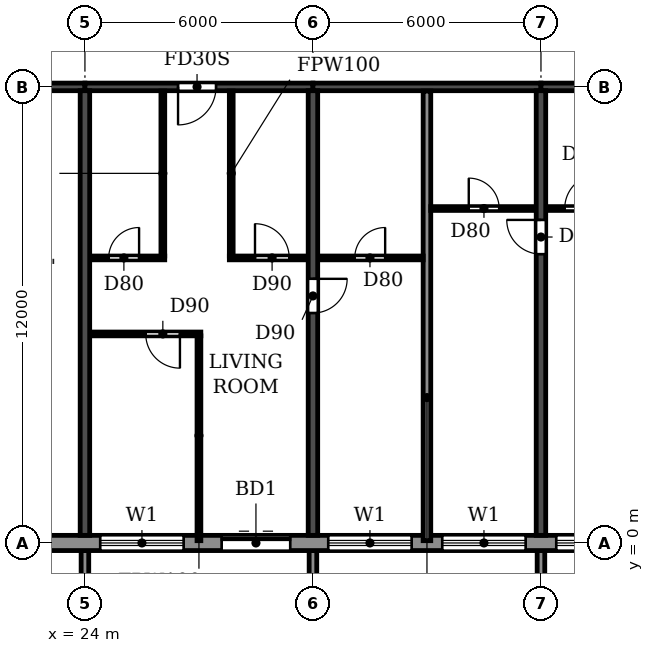
"""IFC4 building model, lengths in metres.
Left out: names, types, materials, properties, quantities, classifications, styles, units other than length and angle.
Written with IfcOpenShell. Run it as: python <this file> out.ifc"""

import sys

from ifc_helpers import new_model, si_unit, direction, frame, frame_2d, origin, place, context, subcontext, project, spatial, polyline, rectangle, outline, extrude, source, transform, mapped, element, fill, save


model = new_model("IFC4")
c1 = context("Model", 3, precision=1e-05, world=origin(), true_north=direction((0.0, 1.0)))
c2 = subcontext(c1, "Body", "Model", "MODEL_VIEW")
j1 = project(units=[si_unit("LENGTHUNIT", "METRE"), si_unit("PLANEANGLEUNIT", "RADIAN")], contexts=[c1])
p1 = place(None, origin())
s1 = spatial("IfcSite", under=j1, at=p1, CompositionType="ELEMENT")
p2 = place(p1, origin())
s2 = spatial("IfcBuilding", under=s1, at=p2, CompositionType="ELEMENT")
p3 = place(p2, frame((0.0, 0.0, 251.1)))
s3 = spatial("IfcBuildingStorey", under=s2, at=p3, CompositionType="ELEMENT", Elevation=251.1)
p4 = place(p3, frame((24.0, 0.2, 0.0), z_axis=(0.0, 0.0, 1.0), x_axis=(0.0, 1.0, 0.0)))
e1 = element("IfcWall", 1, at=p4, inside=s3, PredefinedType="SHEAR", context=c2, shape_type="SweptSolid", body=[
    extrude(rectangle(XDim=11.7, YDim=0.25, at=frame_2d((5.85, 0.0))), origin(), (0.0, 0.0, 1.0), 3.08),
])
p5 = place(p3, frame((30.0, 0.2, 0.0), z_axis=(0.0, 0.0, 1.0), x_axis=(0.0, 1.0, 0.0)))
e2 = element("IfcWall", 2, at=p5, inside=s3, PredefinedType="SHEAR", context=c2, shape_type="SweptSolid", body=[
    extrude(rectangle(XDim=11.7, YDim=0.25, at=frame_2d((5.85, 0.0))), origin(), (0.0, 0.0, 1.0), 3.08),
])
p6 = place(p5, frame((5.85, 0.0, 0.0)))
e3 = element("IfcOpeningElement", 3, at=p6, cuts=e2, PredefinedType="OPENING", context=c2, shape_type="SweptSolid", body=[
    extrude(rectangle(XDim=0.9, YDim=2.1, at=frame_2d((0.45, 1.05))), frame((0.0, 0.135, 0.0), z_axis=(0.0, -1.0, 0.0), x_axis=(1.0, 0.0, 0.0)), (0.0, 0.0, 1.0), 0.27),
])
p7 = place(p3, frame((36.0, 0.2, 0.0), z_axis=(0.0, 0.0, 1.0), x_axis=(0.0, 1.0, 0.0)))
e4 = element("IfcWall", 4, at=p7, inside=s3, PredefinedType="SHEAR", context=c2, shape_type="SweptSolid", body=[
    extrude(rectangle(XDim=11.7, YDim=0.25, at=frame_2d((5.85, 0.0))), origin(), (0.0, 0.0, 1.0), 3.08),
])
p8 = place(p7, frame((7.4, 0.0, 0.0)))
e5 = element("IfcOpeningElement", 5, at=p8, cuts=e4, PredefinedType="OPENING", context=c2, shape_type="SweptSolid", body=[
    extrude(rectangle(XDim=0.9, YDim=2.1, at=frame_2d((0.45, 1.05))), frame((0.0, 0.135, 0.0), z_axis=(0.0, -1.0, 0.0), x_axis=(1.0, 0.0, 0.0)), (0.0, 0.0, 1.0), 0.27),
])
p9 = place(p3, frame((18.2, 12.0, 0.0), z_axis=(0.0, 0.0, 1.0), x_axis=(1.0, 0.0, 0.0)))
e6 = element("IfcWall", 6, at=p9, inside=s3, PredefinedType="SHEAR", context=c2, shape_type="SweptSolid", body=[
    extrude(rectangle(XDim=5.8, YDim=0.2, at=frame_2d((2.9, 0.0))), origin(), (0.0, 0.0, 1.0), 2.48),
])
p10 = place(p9, frame((2.3, 0.0, 0.0)))
e7 = element("IfcOpeningElement", 7, at=p10, cuts=e6, PredefinedType="OPENING", context=c2, shape_type="SweptSolid", body=[
    extrude(rectangle(XDim=1.0, YDim=2.1, at=frame_2d((0.5, 1.05))), frame((0.0, 0.11, 0.0), z_axis=(0.0, -1.0, 0.0), x_axis=(1.0, 0.0, 0.0)), (0.0, 0.0, 1.0), 0.22),
])
p11 = place(p3, frame((24.0, 12.0, 0.0), z_axis=(0.0, 0.0, 1.0), x_axis=(1.0, 0.0, 0.0)))
e8 = element("IfcWall", 8, at=p11, inside=s3, PredefinedType="SHEAR", context=c2, shape_type="SweptSolid", body=[
    extrude(rectangle(XDim=6.0, YDim=0.2, at=frame_2d((3.0, 0.0))), origin(), (0.0, 0.0, 1.0), 2.48),
])
p12 = place(p11, frame((2.45, 0.0, 0.0)))
e9 = element("IfcOpeningElement", 9, at=p12, cuts=e8, PredefinedType="OPENING", context=c2, shape_type="SweptSolid", body=[
    extrude(rectangle(XDim=1.0, YDim=2.1, at=frame_2d((0.5, 1.05))), frame((0.0, 0.11, 0.0), z_axis=(0.0, -1.0, 0.0), x_axis=(1.0, 0.0, 0.0)), (0.0, 0.0, 1.0), 0.22),
])
p13 = place(p3, frame((30.0, 12.0, 0.0), z_axis=(0.0, 0.0, 1.0), x_axis=(1.0, 0.0, 0.0)))
e10 = element("IfcWall", 10, at=p13, inside=s3, PredefinedType="SHEAR", context=c2, shape_type="SweptSolid", body=[
    extrude(rectangle(XDim=6.0, YDim=0.2, at=frame_2d((3.0, 0.0))), origin(), (0.0, 0.0, 1.0), 2.48),
])
p14 = place(p3, frame((36.0, 12.0, 0.0), z_axis=(0.0, 0.0, 1.0), x_axis=(1.0, 0.0, 0.0)))
e11 = element("IfcWall", 11, at=p14, inside=s3, PredefinedType="SHEAR", context=c2, shape_type="SweptSolid", body=[
    extrude(rectangle(XDim=6.0, YDim=0.2, at=frame_2d((3.0, 0.0))), origin(), (0.0, 0.0, 1.0), 2.48),
])
p15 = place(p14, frame((2.55, 0.0, 0.0)))
e12 = element("IfcOpeningElement", 12, at=p15, cuts=e11, PredefinedType="OPENING", context=c2, shape_type="SweptSolid", body=[
    extrude(rectangle(XDim=1.0, YDim=2.1, at=frame_2d((0.5, 1.05))), frame((0.0, 0.11, 0.0), z_axis=(0.0, -1.0, 0.0), x_axis=(1.0, 0.0, 0.0)), (0.0, 0.0, 1.0), 0.22),
])
p16 = place(p3, frame((22.683, 0.0, 0.0), z_axis=(0.0, 0.0, 1.0), x_axis=(1.0, 0.0, 0.0)))
e13 = element("IfcWall", 13, at=p16, inside=s3, PredefinedType="STANDARD", context=c2, shape_type="SweptSolid", body=[
    extrude(rectangle(XDim=56.634, YDim=0.4, at=frame_2d((28.317, 0.0))), origin(), (0.0, 0.0, 1.0), 3.08),
])
p17 = place(p16, frame((1.717, 0.0, 0.9)))
e14 = element("IfcOpeningElement", 14, at=p17, cuts=e13, PredefinedType="OPENING", context=c2, shape_type="SweptSolid", body=[
    extrude(rectangle(XDim=2.2, YDim=1.5, at=frame_2d((1.1, 0.75))), frame((0.0, 0.21, 0.0), z_axis=(0.0, -1.0, 0.0), x_axis=(1.0, 0.0, 0.0)), (0.0, 0.0, 1.0), 0.42),
])
p18 = place(p16, frame((4.917, 0.0, 0.0)))
e15 = element("IfcOpeningElement", 15, at=p18, cuts=e13, PredefinedType="OPENING", context=c2, shape_type="SweptSolid", body=[
    extrude(rectangle(XDim=1.8, YDim=2.4, at=frame_2d((0.9, 1.2))), frame((0.0, 0.21, 0.0), z_axis=(0.0, -1.0, 0.0), x_axis=(1.0, 0.0, 0.0)), (0.0, 0.0, 1.0), 0.42),
])
p19 = place(p16, frame((7.717, 0.0, 0.9)))
e16 = element("IfcOpeningElement", 16, at=p19, cuts=e13, PredefinedType="OPENING", context=c2, shape_type="SweptSolid", body=[
    extrude(rectangle(XDim=2.2, YDim=1.5, at=frame_2d((1.1, 0.75))), frame((0.0, 0.21, 0.0), z_axis=(0.0, -1.0, 0.0), x_axis=(1.0, 0.0, 0.0)), (0.0, 0.0, 1.0), 0.42),
])
p20 = place(p16, frame((10.717, 0.0, 0.9)))
e17 = element("IfcOpeningElement", 17, at=p20, cuts=e13, PredefinedType="OPENING", context=c2, shape_type="SweptSolid", body=[
    extrude(rectangle(XDim=2.2, YDim=1.5, at=frame_2d((1.1, 0.75))), frame((0.0, 0.21, 0.0), z_axis=(0.0, -1.0, 0.0), x_axis=(1.0, 0.0, 0.0)), (0.0, 0.0, 1.0), 0.42),
])
p21 = place(p16, frame((13.717, 0.0, 0.9)))
e18 = element("IfcOpeningElement", 18, at=p21, cuts=e13, PredefinedType="OPENING", context=c2, shape_type="SweptSolid", body=[
    extrude(rectangle(XDim=2.2, YDim=1.5, at=frame_2d((1.1, 0.75))), frame((0.0, 0.21, 0.0), z_axis=(0.0, -1.0, 0.0), x_axis=(1.0, 0.0, 0.0)), (0.0, 0.0, 1.0), 0.42),
])
p22 = place(p16, frame((16.917, 0.0, 0.0)))
e19 = element("IfcOpeningElement", 19, at=p22, cuts=e13, PredefinedType="OPENING", context=c2, shape_type="SweptSolid", body=[
    extrude(rectangle(XDim=1.8, YDim=2.4, at=frame_2d((0.9, 1.2))), frame((0.0, 0.21, 0.0), z_axis=(0.0, -1.0, 0.0), x_axis=(1.0, 0.0, 0.0)), (0.0, 0.0, 1.0), 0.42),
])
p23 = place(p16, frame((19.717, 0.0, 0.9)))
e20 = element("IfcOpeningElement", 20, at=p23, cuts=e13, PredefinedType="OPENING", context=c2, shape_type="SweptSolid", body=[
    extrude(rectangle(XDim=2.2, YDim=1.5, at=frame_2d((1.1, 0.75))), frame((0.0, 0.21, 0.0), z_axis=(0.0, -1.0, 0.0), x_axis=(1.0, 0.0, 0.0)), (0.0, 0.0, 1.0), 0.42),
])
p24 = place(p16, frame((22.717, 0.0, 0.9)))
e21 = element("IfcOpeningElement", 21, at=p24, cuts=e13, PredefinedType="OPENING", context=c2, shape_type="SweptSolid", body=[
    extrude(rectangle(XDim=2.2, YDim=1.5, at=frame_2d((1.1, 0.75))), frame((0.0, 0.21, 0.0), z_axis=(0.0, -1.0, 0.0), x_axis=(1.0, 0.0, 0.0)), (0.0, 0.0, 1.0), 0.42),
])
p25 = place(p16, frame((25.717, 0.0, 0.9)))
e22 = element("IfcOpeningElement", 22, at=p25, cuts=e13, PredefinedType="OPENING", context=c2, shape_type="SweptSolid", body=[
    extrude(rectangle(XDim=2.2, YDim=1.5, at=frame_2d((1.1, 0.75))), frame((0.0, 0.21, 0.0), z_axis=(0.0, -1.0, 0.0), x_axis=(1.0, 0.0, 0.0)), (0.0, 0.0, 1.0), 0.42),
])
p26 = place(p16, frame((28.917, 0.0, 0.0)))
e23 = element("IfcOpeningElement", 23, at=p26, cuts=e13, PredefinedType="OPENING", context=c2, shape_type="SweptSolid", body=[
    extrude(rectangle(XDim=1.8, YDim=2.4, at=frame_2d((0.9, 1.2))), frame((0.0, 0.21, 0.0), z_axis=(0.0, -1.0, 0.0), x_axis=(1.0, 0.0, 0.0)), (0.0, 0.0, 1.0), 0.42),
])
p27 = place(p16, frame((31.717, 0.0, 0.9)))
e24 = element("IfcOpeningElement", 24, at=p27, cuts=e13, PredefinedType="OPENING", context=c2, shape_type="SweptSolid", body=[
    extrude(rectangle(XDim=2.2, YDim=1.5, at=frame_2d((1.1, 0.75))), frame((0.0, 0.21, 0.0), z_axis=(0.0, -1.0, 0.0), x_axis=(1.0, 0.0, 0.0)), (0.0, 0.0, 1.0), 0.42),
])
p28 = place(p16, frame((34.717, 0.0, 0.9)))
e25 = element("IfcOpeningElement", 25, at=p28, cuts=e13, PredefinedType="OPENING", context=c2, shape_type="SweptSolid", body=[
    extrude(rectangle(XDim=2.2, YDim=1.5, at=frame_2d((1.1, 0.75))), frame((0.0, 0.21, 0.0), z_axis=(0.0, -1.0, 0.0), x_axis=(1.0, 0.0, 0.0)), (0.0, 0.0, 1.0), 0.42),
])
p29 = place(p16, frame((37.717, 0.0, 0.9)))
e26 = element("IfcOpeningElement", 26, at=p29, cuts=e13, PredefinedType="OPENING", context=c2, shape_type="SweptSolid", body=[
    extrude(rectangle(XDim=2.2, YDim=1.5, at=frame_2d((1.1, 0.75))), frame((0.0, 0.21, 0.0), z_axis=(0.0, -1.0, 0.0), x_axis=(1.0, 0.0, 0.0)), (0.0, 0.0, 1.0), 0.42),
])
p30 = place(p16, frame((40.917, 0.0, 0.0)))
e27 = element("IfcOpeningElement", 27, at=p30, cuts=e13, PredefinedType="OPENING", context=c2, shape_type="SweptSolid", body=[
    extrude(rectangle(XDim=1.8, YDim=2.4, at=frame_2d((0.9, 1.2))), frame((0.0, 0.21, 0.0), z_axis=(0.0, -1.0, 0.0), x_axis=(1.0, 0.0, 0.0)), (0.0, 0.0, 1.0), 0.42),
])
p31 = place(p16, frame((43.717, 0.0, 0.9)))
e28 = element("IfcOpeningElement", 28, at=p31, cuts=e13, PredefinedType="OPENING", context=c2, shape_type="SweptSolid", body=[
    extrude(rectangle(XDim=2.2, YDim=1.5, at=frame_2d((1.1, 0.75))), frame((0.0, 0.21, 0.0), z_axis=(0.0, -1.0, 0.0), x_axis=(1.0, 0.0, 0.0)), (0.0, 0.0, 1.0), 0.42),
])
p32 = place(p16, frame((46.717, 0.0, 0.9)))
e29 = element("IfcOpeningElement", 29, at=p32, cuts=e13, PredefinedType="OPENING", context=c2, shape_type="SweptSolid", body=[
    extrude(rectangle(XDim=2.2, YDim=1.5, at=frame_2d((1.1, 0.75))), frame((0.0, 0.21, 0.0), z_axis=(0.0, -1.0, 0.0), x_axis=(1.0, 0.0, 0.0)), (0.0, 0.0, 1.0), 0.42),
])
p33 = place(p16, frame((49.717, 0.0, 0.9)))
e30 = element("IfcOpeningElement", 30, at=p33, cuts=e13, PredefinedType="OPENING", context=c2, shape_type="SweptSolid", body=[
    extrude(rectangle(XDim=2.2, YDim=1.5, at=frame_2d((1.1, 0.75))), frame((0.0, 0.21, 0.0), z_axis=(0.0, -1.0, 0.0), x_axis=(1.0, 0.0, 0.0)), (0.0, 0.0, 1.0), 0.42),
])
p34 = place(p16, frame((52.917, 0.0, 0.0)))
e31 = element("IfcOpeningElement", 31, at=p34, cuts=e13, PredefinedType="OPENING", context=c2, shape_type="SweptSolid", body=[
    extrude(rectangle(XDim=1.8, YDim=2.4, at=frame_2d((0.9, 1.2))), frame((0.0, 0.21, 0.0), z_axis=(0.0, -1.0, 0.0), x_axis=(1.0, 0.0, 0.0)), (0.0, 0.0, 1.0), 0.42),
])
m1 = source(origin(), c2, "Body", "SweptSolid", [
    extrude(outline(polyline([(0.0, 0.0), (0.2, 0.0), (0.2, 1.65), (0.0, 1.65), (0.0, 0.0)])), origin(), (0.0, 0.0, 1.0), 3.1),
])
for number, where in (
    (32, (23.9, -1.85, 0.0)),
    (33, (29.9, -1.85, 0.0)),
    (34, (35.9, -1.85, 0.0)),
):
    element("IfcWall", number, at=place(p3, frame(where)), inside=s3, PredefinedType="STANDARD", context=c2, shape_type="MappedRepresentation", body=[
        mapped(m1, transform((0.0, 0.0, 0.0))),
    ])
p35 = place(p3, frame((33.0, 0.06, 0.0), z_axis=(0.0, 0.0, 1.0), x_axis=(0.0, 1.0, 0.0)))
e35 = element("IfcWall", 35, at=p35, inside=s3, PredefinedType="PARTITIONING", context=c2, shape_type="SweptSolid", body=[
    extrude(rectangle(XDim=11.83, YDim=0.2, at=frame_2d((5.915, 0.0))), origin(), (0.0, 0.0, 1.0), 3.08),
])
p36 = place(p3, frame((24.135, 5.5, 0.0), z_axis=(0.0, 0.0, 1.0), x_axis=(1.0, 0.0, 0.0)))
e36 = element("IfcWall", 36, at=p36, inside=s3, PredefinedType="PARTITIONING", context=c2, shape_type="SweptSolid", body=[
    extrude(rectangle(XDim=2.915, YDim=0.1, at=frame_2d((1.458, 0.0))), origin(), (0.0, 0.0, 1.0), 3.08),
])
p37 = place(p36, frame((1.465, 0.0, 0.0)))
e37 = element("IfcOpeningElement", 37, at=p37, cuts=e36, PredefinedType="OPENING", context=c2, shape_type="SweptSolid", body=[
    extrude(rectangle(XDim=0.9, YDim=2.1, at=frame_2d((0.45, 1.05))), frame((0.0, 0.06, 0.0), z_axis=(0.0, -1.0, 0.0), x_axis=(1.0, 0.0, 0.0)), (0.0, 0.0, 1.0), 0.12),
])
p38 = place(p3, frame((24.135, 7.5, 0.0), z_axis=(0.0, 0.0, 1.0), x_axis=(1.0, 0.0, 0.0)))
e38 = element("IfcWall", 38, at=p38, inside=s3, PredefinedType="PARTITIONING", context=c2, shape_type="SweptSolid", body=[
    extrude(rectangle(XDim=1.965, YDim=0.1, at=frame_2d((0.982, 0.0))), origin(), (0.0, 0.0, 1.0), 3.08),
])
p39 = place(p38, frame((0.49, 0.0, 0.0)))
e39 = element("IfcOpeningElement", 39, at=p39, cuts=e38, PredefinedType="OPENING", context=c2, shape_type="SweptSolid", body=[
    extrude(rectangle(XDim=0.8, YDim=2.1, at=frame_2d((0.4, 1.05))), frame((0.0, 0.06, 0.0), z_axis=(0.0, -1.0, 0.0), x_axis=(1.0, 0.0, 0.0)), (0.0, 0.0, 1.0), 0.12),
])
p40 = place(p3, frame((27.8, 7.5, 0.0), z_axis=(0.0, 0.0, 1.0), x_axis=(1.0, 0.0, 0.0)))
e40 = element("IfcWall", 40, at=p40, inside=s3, PredefinedType="PARTITIONING", context=c2, shape_type="SweptSolid", body=[
    extrude(rectangle(XDim=2.065, YDim=0.1, at=frame_2d((1.032, 0.0))), origin(), (0.0, 0.0, 1.0), 3.08),
])
p41 = place(p40, frame((0.675, 0.0, 0.0)))
e41 = element("IfcOpeningElement", 41, at=p41, cuts=e40, PredefinedType="OPENING", context=c2, shape_type="SweptSolid", body=[
    extrude(rectangle(XDim=0.9, YDim=2.1, at=frame_2d((0.45, 1.05))), frame((0.0, 0.06, 0.0), z_axis=(0.0, -1.0, 0.0), x_axis=(1.0, 0.0, 0.0)), (0.0, 0.0, 1.0), 0.12),
])
p42 = place(p3, frame((30.135, 7.5, 0.0), z_axis=(0.0, 0.0, 1.0), x_axis=(1.0, 0.0, 0.0)))
e42 = element("IfcWall", 42, at=p42, inside=s3, PredefinedType="PARTITIONING", context=c2, shape_type="SweptSolid", body=[
    extrude(rectangle(XDim=2.765, YDim=0.1, at=frame_2d((1.382, 0.0))), origin(), (0.0, 0.0, 1.0), 3.08),
])
p43 = place(p42, frame((0.965, 0.0, 0.0)))
e43 = element("IfcOpeningElement", 43, at=p43, cuts=e42, PredefinedType="OPENING", context=c2, shape_type="SweptSolid", body=[
    extrude(rectangle(XDim=0.8, YDim=2.1, at=frame_2d((0.4, 1.05))), frame((0.0, 0.06, 0.0), z_axis=(0.0, -1.0, 0.0), x_axis=(1.0, 0.0, 0.0)), (0.0, 0.0, 1.0), 0.12),
])
p44 = place(p3, frame((33.1, 8.8, 0.0), z_axis=(0.0, 0.0, 1.0), x_axis=(1.0, 0.0, 0.0)))
e44 = element("IfcWall", 44, at=p44, inside=s3, PredefinedType="PARTITIONING", context=c2, shape_type="SweptSolid", body=[
    extrude(rectangle(XDim=2.765, YDim=0.1, at=frame_2d((1.382, 0.0))), origin(), (0.0, 0.0, 1.0), 3.08),
])
p45 = place(p44, frame((1.0, 0.0, 0.0)))
e45 = element("IfcOpeningElement", 45, at=p45, cuts=e44, PredefinedType="OPENING", context=c2, shape_type="SweptSolid", body=[
    extrude(rectangle(XDim=0.8, YDim=2.1, at=frame_2d((0.4, 1.05))), frame((0.0, 0.06, 0.0), z_axis=(0.0, -1.0, 0.0), x_axis=(1.0, 0.0, 0.0)), (0.0, 0.0, 1.0), 0.12),
])
p46 = place(p3, frame((36.135, 8.8, 0.0), z_axis=(0.0, 0.0, 1.0), x_axis=(1.0, 0.0, 0.0)))
e46 = element("IfcWall", 46, at=p46, inside=s3, PredefinedType="PARTITIONING", context=c2, shape_type="SweptSolid", body=[
    extrude(rectangle(XDim=2.065, YDim=0.1, at=frame_2d((1.032, 0.0))), origin(), (0.0, 0.0, 1.0), 3.08),
])
p47 = place(p46, frame((0.49, 0.0, 0.0)))
e47 = element("IfcOpeningElement", 47, at=p47, cuts=e46, PredefinedType="OPENING", context=c2, shape_type="SweptSolid", body=[
    extrude(rectangle(XDim=0.9, YDim=2.1, at=frame_2d((0.45, 1.05))), frame((0.0, 0.06, 0.0), z_axis=(0.0, -1.0, 0.0), x_axis=(1.0, 0.0, 0.0)), (0.0, 0.0, 1.0), 0.12),
])
p48 = place(p3, frame((26.05, 7.55, 0.0), z_axis=(0.0, 0.0, 1.0), x_axis=(0.0, 1.0, 0.0)))
e48 = element("IfcWall", 48, at=p48, inside=s3, PredefinedType="PARTITIONING", context=c2, shape_type="SweptSolid", body=[
    extrude(rectangle(XDim=4.34, YDim=0.1, at=frame_2d((2.17, 0.0))), origin(), (0.0, 0.0, 1.0), 3.08),
])
p49 = place(p3, frame((27.0, 0.06, 0.0), z_axis=(0.0, 0.0, 1.0), x_axis=(0.0, 1.0, 0.0)))
e49 = element("IfcWall", 49, at=p49, inside=s3, PredefinedType="PARTITIONING", context=c2, shape_type="SweptSolid", body=[
    extrude(rectangle(XDim=5.39, YDim=0.1, at=frame_2d((2.695, 0.0))), origin(), (0.0, 0.0, 1.0), 3.08),
])
p50 = place(p3, frame((27.85, 7.55, 0.0), z_axis=(0.0, 0.0, 1.0), x_axis=(0.0, 1.0, 0.0)))
e50 = element("IfcWall", 50, at=p50, inside=s3, PredefinedType="PARTITIONING", context=c2, shape_type="SweptSolid", body=[
    extrude(rectangle(XDim=4.34, YDim=0.1, at=frame_2d((2.17, 0.0))), origin(), (0.0, 0.0, 1.0), 3.08),
])
p51 = place(p17, origin())
e51 = element("IfcWindow", 51, at=p51, inside=s3, PartitioningType="DOUBLE_PANEL_HORIZONTAL", PredefinedType="WINDOW", context=c2, shape_type="SweptSolid", body=[
    extrude(rectangle(XDim=2.2, YDim=1.5, at=frame_2d((1.1, 0.75))), frame((0.0, 0.03, 0.0), z_axis=(0.0, -1.0, 0.0), x_axis=(1.0, 0.0, 0.0)), (0.0, 0.0, 1.0), 0.06),
])
fill(e14, e51)
p52 = place(p18, origin())
e52 = element("IfcDoor", 52, at=p52, inside=s3, OperationType="DOUBLE_DOOR_SLIDING", PredefinedType="DOOR", context=c2, shape_type="SweptSolid", body=[
    extrude(rectangle(XDim=1.8, YDim=2.4, at=frame_2d((0.9, 1.2))), frame((0.0, 0.025, 0.0), z_axis=(0.0, -1.0, 0.0), x_axis=(1.0, 0.0, 0.0)), (0.0, 0.0, 1.0), 0.05),
])
fill(e15, e52)
p53 = place(p19, origin())
e53 = element("IfcWindow", 53, at=p53, inside=s3, PartitioningType="DOUBLE_PANEL_HORIZONTAL", PredefinedType="WINDOW", context=c2, shape_type="SweptSolid", body=[
    extrude(rectangle(XDim=2.2, YDim=1.5, at=frame_2d((1.1, 0.75))), frame((0.0, 0.03, 0.0), z_axis=(0.0, -1.0, 0.0), x_axis=(1.0, 0.0, 0.0)), (0.0, 0.0, 1.0), 0.06),
])
fill(e16, e53)
p54 = place(p20, origin())
e54 = element("IfcWindow", 54, at=p54, inside=s3, PartitioningType="DOUBLE_PANEL_HORIZONTAL", PredefinedType="WINDOW", context=c2, shape_type="SweptSolid", body=[
    extrude(rectangle(XDim=2.2, YDim=1.5, at=frame_2d((1.1, 0.75))), frame((0.0, 0.03, 0.0), z_axis=(0.0, -1.0, 0.0), x_axis=(1.0, 0.0, 0.0)), (0.0, 0.0, 1.0), 0.06),
])
fill(e17, e54)
p55 = place(p21, origin())
e55 = element("IfcWindow", 55, at=p55, inside=s3, PartitioningType="DOUBLE_PANEL_HORIZONTAL", PredefinedType="WINDOW", context=c2, shape_type="SweptSolid", body=[
    extrude(rectangle(XDim=2.2, YDim=1.5, at=frame_2d((1.1, 0.75))), frame((0.0, 0.03, 0.0), z_axis=(0.0, -1.0, 0.0), x_axis=(1.0, 0.0, 0.0)), (0.0, 0.0, 1.0), 0.06),
])
fill(e18, e55)
p56 = place(p43, origin())
e56 = element("IfcDoor", 56, at=p56, inside=s3, OperationType="SINGLE_SWING_RIGHT", PredefinedType="DOOR", context=c2, shape_type="SweptSolid", body=[
    extrude(rectangle(XDim=0.8, YDim=2.1, at=frame_2d((0.4, 1.05))), frame((0.0, 0.025, 0.0), z_axis=(0.0, -1.0, 0.0), x_axis=(1.0, 0.0, 0.0)), (0.0, 0.0, 1.0), 0.05),
])
fill(e43, e56)
p57 = place(p39, origin())
e57 = element("IfcDoor", 57, at=p57, inside=s3, OperationType="SINGLE_SWING_RIGHT", PredefinedType="DOOR", context=c2, shape_type="SweptSolid", body=[
    extrude(rectangle(XDim=0.8, YDim=2.1, at=frame_2d((0.4, 1.05))), frame((0.0, 0.025, 0.0), z_axis=(0.0, -1.0, 0.0), x_axis=(1.0, 0.0, 0.0)), (0.0, 0.0, 1.0), 0.05),
])
fill(e39, e57)
p58 = place(p37, frame((0.9, 0.0, 0.0), z_axis=(0.0, 0.0, 1.0), x_axis=(-1.0, 0.0, 0.0)))
e58 = element("IfcDoor", 58, at=p58, inside=s3, OperationType="SINGLE_SWING_LEFT", PredefinedType="DOOR", context=c2, shape_type="SweptSolid", body=[
    extrude(rectangle(XDim=0.9, YDim=2.1, at=frame_2d((0.45, 1.05))), frame((0.0, 0.025, 0.0), z_axis=(0.0, -1.0, 0.0), x_axis=(1.0, 0.0, 0.0)), (0.0, 0.0, 1.0), 0.05),
])
fill(e37, e58)
p59 = place(p12, frame((1.0, 0.0, 0.0), z_axis=(0.0, 0.0, 1.0), x_axis=(-1.0, 0.0, 0.0)))
e59 = element("IfcDoor", 59, at=p59, inside=s3, OperationType="SINGLE_SWING_RIGHT", PredefinedType="DOOR", context=c2, shape_type="SweptSolid", body=[
    extrude(rectangle(XDim=1.0, YDim=2.1, at=frame_2d((0.5, 1.05))), frame((0.0, 0.025, 0.0), z_axis=(0.0, -1.0, 0.0), x_axis=(1.0, 0.0, 0.0)), (0.0, 0.0, 1.0), 0.05),
])
fill(e9, e59)
p60 = place(p41, origin())
e60 = element("IfcDoor", 60, at=p60, inside=s3, OperationType="SINGLE_SWING_LEFT", PredefinedType="DOOR", context=c2, shape_type="SweptSolid", body=[
    extrude(rectangle(XDim=0.9, YDim=2.1, at=frame_2d((0.45, 1.05))), frame((0.0, 0.025, 0.0), z_axis=(0.0, -1.0, 0.0), x_axis=(1.0, 0.0, 0.0)), (0.0, 0.0, 1.0), 0.05),
])
fill(e41, e60)
p61 = place(p6, frame((0.9, 0.0, 0.0), z_axis=(0.0, 0.0, 1.0), x_axis=(-1.0, 0.0, 0.0)))
e61 = element("IfcDoor", 61, at=p61, inside=s3, OperationType="SINGLE_SWING_LEFT", PredefinedType="DOOR", context=c2, shape_type="SweptSolid", body=[
    extrude(rectangle(XDim=0.9, YDim=2.1, at=frame_2d((0.45, 1.05))), frame((0.0, 0.025, 0.0), z_axis=(0.0, -1.0, 0.0), x_axis=(1.0, 0.0, 0.0)), (0.0, 0.0, 1.0), 0.05),
])
fill(e3, e61)
p62 = place(p45, origin())
e62 = element("IfcDoor", 62, at=p62, inside=s3, OperationType="SINGLE_SWING_LEFT", PredefinedType="DOOR", context=c2, shape_type="SweptSolid", body=[
    extrude(rectangle(XDim=0.8, YDim=2.1, at=frame_2d((0.4, 1.05))), frame((0.0, 0.025, 0.0), z_axis=(0.0, -1.0, 0.0), x_axis=(1.0, 0.0, 0.0)), (0.0, 0.0, 1.0), 0.05),
])
fill(e45, e62)
p63 = place(p8, origin())
e63 = element("IfcDoor", 63, at=p63, inside=s3, OperationType="SINGLE_SWING_RIGHT", PredefinedType="DOOR", context=c2, shape_type="SweptSolid", body=[
    extrude(rectangle(XDim=0.9, YDim=2.1, at=frame_2d((0.45, 1.05))), frame((0.0, 0.025, 0.0), z_axis=(0.0, -1.0, 0.0), x_axis=(1.0, 0.0, 0.0)), (0.0, 0.0, 1.0), 0.05),
])
fill(e5, e63)
p64 = place(p47, origin())
e64 = element("IfcDoor", 64, at=p64, inside=s3, OperationType="SINGLE_SWING_RIGHT", PredefinedType="DOOR", context=c2, shape_type="SweptSolid", body=[
    extrude(rectangle(XDim=0.9, YDim=2.1, at=frame_2d((0.45, 1.05))), frame((0.0, 0.025, 0.0), z_axis=(0.0, -1.0, 0.0), x_axis=(1.0, 0.0, 0.0)), (0.0, 0.0, 1.0), 0.05),
])
fill(e47, e64)
save(model, sys.argv[1])
